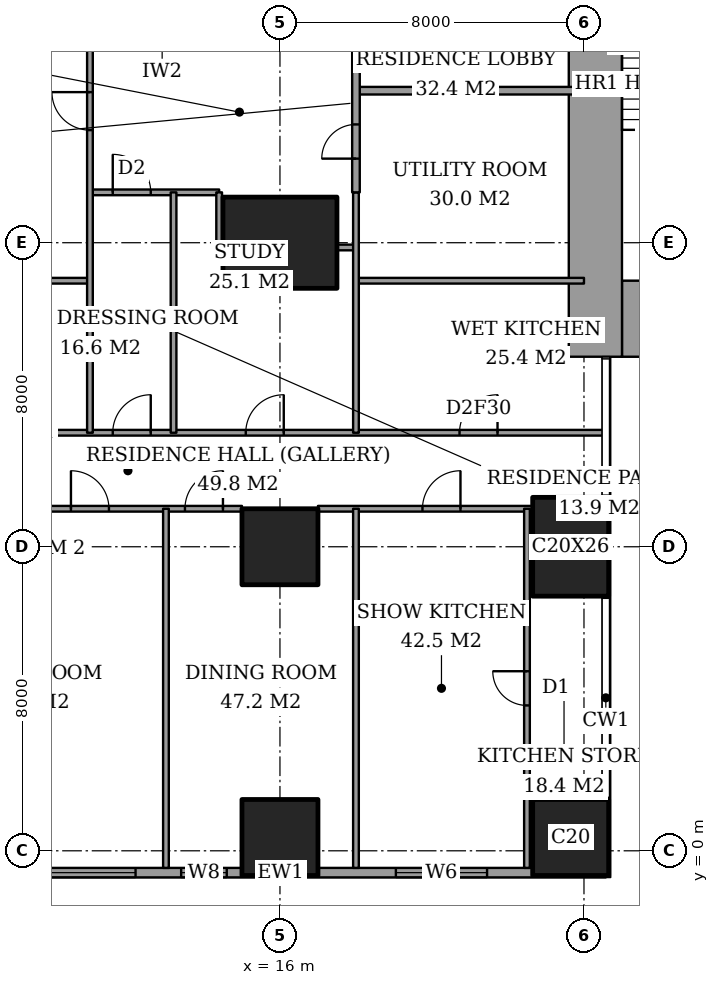
"""IFC4 building model, lengths in metres.
Left out: names, types, materials, properties, quantities, classifications, styles, units other than length and angle.
Written with IfcOpenShell. Run it as: python <this file> out.ifc"""

import sys

from ifc_helpers import new_model, si_unit, direction, frame, frame_2d, origin, origin_2d, place, context, subcontext, project, spatial, rectangle, extrude, element, fill, save


model = new_model("IFC4")
c1 = context("Model", 3, precision=1e-05, world=origin(), true_north=direction((0.0, 1.0)))
c2 = subcontext(c1, "Body", "Model", "MODEL_VIEW")
j1 = project(units=[si_unit("LENGTHUNIT", "METRE"), si_unit("PLANEANGLEUNIT", "RADIAN")], contexts=[c1])
p1 = place(None, origin())
s1 = spatial("IfcSite", under=j1, at=p1, CompositionType="ELEMENT")
p2 = place(p1, origin())
s2 = spatial("IfcBuilding", under=s1, at=p2, CompositionType="ELEMENT")
p3 = place(p2, frame((0.0, 0.0, 69.2)))
s3 = spatial("IfcBuildingStorey", under=s2, at=p3, CompositionType="ELEMENT", Elevation=69.2)
for number, where, z_axis, x_axis in (
    (1, (16.0, 0.35, 0.0), (0.0, 0.0, 1.0), (1.0, 0.0, 0.0)),
    (2, (16.0, 8.0, 0.0), (0.0, 0.0, 1.0), (1.0, 0.0, 0.0)),
):
    element("IfcColumn", number, at=place(p3, frame(where, z_axis=z_axis, x_axis=x_axis)), inside=s3, PredefinedType="COLUMN", context=c2, shape_type="SweptSolid", body=[
        extrude(rectangle(XDim=2.0, YDim=2.0, at=origin_2d()), origin(), (0.0, 0.0, 1.0), 3.6),
    ])
p4 = place(p3, frame((16.0, 16.0, 0.0), z_axis=(0.0, 0.0, 1.0), x_axis=(1.0, 0.0, 0.0)))
e3 = element("IfcColumn", 3, at=p4, inside=s3, PredefinedType="COLUMN", context=c2, shape_type="SweptSolid", body=[
    extrude(rectangle(XDim=3.0, YDim=2.4, at=origin_2d()), origin(), (0.0, 0.0, 1.0), 3.6),
])
p5 = place(p3, frame((23.65, 0.35, 0.0), z_axis=(0.0, 0.0, 1.0), x_axis=(1.0, 0.0, 0.0)))
e4 = element("IfcColumn", 4, at=p5, inside=s3, PredefinedType="COLUMN", context=c2, shape_type="SweptSolid", body=[
    extrude(rectangle(XDim=2.0, YDim=2.0, at=origin_2d()), origin(), (0.0, 0.0, 1.0), 3.6),
])
p6 = place(p3, frame((23.65, 8.0, 0.0), z_axis=(0.0, 0.0, 1.0), x_axis=(1.0, 0.0, 0.0)))
e5 = element("IfcColumn", 5, at=p6, inside=s3, PredefinedType="COLUMN", context=c2, shape_type="SweptSolid", body=[
    extrude(rectangle(XDim=2.0, YDim=2.6, at=origin_2d()), origin(), (0.0, 0.0, 1.0), 3.6),
])
p7 = place(p3, frame((25.0, 14.0, 0.0), z_axis=(0.0, 0.0, 1.0), x_axis=(1.0, 0.0, 0.0)))
e6 = element("IfcWall", 6, at=p7, inside=s3, PredefinedType="SHEAR", context=c2, shape_type="SweptSolid", body=[
    extrude(rectangle(XDim=3.15, YDim=2.0, at=frame_2d((1.575, 0.0))), origin(), (0.0, 0.0, 1.0), 3.6),
])
p8 = place(p3, frame((24.3, 13.0, 0.0), z_axis=(0.0, 0.0, 1.0), x_axis=(0.0, 1.0, 0.0)))
e7 = element("IfcWall", 7, at=p8, inside=s3, PredefinedType="SHEAR", context=c2, shape_type="SweptSolid", body=[
    extrude(rectangle(XDim=10.15, YDim=1.4, at=frame_2d((5.075, 0.0))), origin(), (0.0, 0.0, 1.0), 3.6),
])
p9 = place(p3, frame((3.175, -0.575, 0.0), z_axis=(0.0, 0.0, 1.0), x_axis=(1.0, 0.0, 0.0)))
e8 = element("IfcWall", 8, at=p9, inside=s3, PredefinedType="SOLIDWALL", context=c2, shape_type="SweptSolid", body=[
    extrude(rectangle(XDim=21.4, YDim=0.25, at=frame_2d((10.7, 0.0))), origin(), (0.0, 0.0, 1.0), 3.6),
])
p10 = place(p9, frame((0.775, 0.0, 0.6)))
e9 = element("IfcOpeningElement", 9, at=p10, cuts=e8, PredefinedType="OPENING", context=c2, shape_type="SweptSolid", body=[
    extrude(rectangle(XDim=1.2, YDim=2.0, at=frame_2d((0.6, 1.0))), frame((0.0, 0.135, 0.0), z_axis=(0.0, -1.0, 0.0), x_axis=(1.0, 0.0, 0.0)), (0.0, 0.0, 1.0), 0.27),
])
p11 = place(p9, frame((6.625, 0.0, 0.6)))
e10 = element("IfcOpeningElement", 10, at=p11, cuts=e8, PredefinedType="OPENING", context=c2, shape_type="SweptSolid", body=[
    extrude(rectangle(XDim=2.4, YDim=2.0, at=frame_2d((1.2, 1.0))), frame((0.0, 0.135, 0.0), z_axis=(0.0, -1.0, 0.0), x_axis=(1.0, 0.0, 0.0)), (0.0, 0.0, 1.0), 0.27),
])
p12 = place(p9, frame((10.225, 0.0, 0.6)))
e11 = element("IfcOpeningElement", 11, at=p12, cuts=e8, PredefinedType="OPENING", context=c2, shape_type="SweptSolid", body=[
    extrude(rectangle(XDim=1.2, YDim=2.0, at=frame_2d((0.6, 1.0))), frame((0.0, 0.135, 0.0), z_axis=(0.0, -1.0, 0.0), x_axis=(1.0, 0.0, 0.0)), (0.0, 0.0, 1.0), 0.27),
])
p13 = place(p9, frame((15.875, 0.0, 0.6)))
e12 = element("IfcOpeningElement", 12, at=p13, cuts=e8, PredefinedType="OPENING", context=c2, shape_type="SweptSolid", body=[
    extrude(rectangle(XDim=2.4, YDim=2.0, at=frame_2d((1.2, 1.0))), frame((0.0, 0.135, 0.0), z_axis=(0.0, -1.0, 0.0), x_axis=(1.0, 0.0, 0.0)), (0.0, 0.0, 1.0), 0.27),
])
p14 = place(p3, frame((9.0, 9.0, 0.0), z_axis=(0.0, 0.0, 1.0), x_axis=(1.0, 0.0, 0.0)))
e13 = element("IfcWall", 13, at=p14, inside=s3, PredefinedType="PARTITIONING", context=c2, shape_type="SweptSolid", body=[
    extrude(rectangle(XDim=6.0, YDim=0.15, at=frame_2d((3.0, 0.0))), origin(), (0.0, 0.0, 1.0), 3.35),
])
p15 = place(p14, frame((1.5, 0.0, 0.0)))
e14 = element("IfcOpeningElement", 14, at=p15, cuts=e13, PredefinedType="OPENING", context=c2, shape_type="SweptSolid", body=[
    extrude(rectangle(XDim=1.0, YDim=2.1, at=frame_2d((0.5, 1.05))), frame((0.0, 0.085, 0.0), z_axis=(0.0, -1.0, 0.0), x_axis=(1.0, 0.0, 0.0)), (0.0, 0.0, 1.0), 0.17),
])
p16 = place(p14, frame((4.5, 0.0, 0.0)))
e15 = element("IfcOpeningElement", 15, at=p16, cuts=e13, PredefinedType="OPENING", context=c2, shape_type="SweptSolid", body=[
    extrude(rectangle(XDim=1.0, YDim=2.1, at=frame_2d((0.5, 1.05))), frame((0.0, 0.085, 0.0), z_axis=(0.0, -1.0, 0.0), x_axis=(1.0, 0.0, 0.0)), (0.0, 0.0, 1.0), 0.17),
])
p17 = place(p3, frame((17.0, 9.0, 0.0), z_axis=(0.0, 0.0, 1.0), x_axis=(1.0, 0.0, 0.0)))
e16 = element("IfcWall", 16, at=p17, inside=s3, PredefinedType="PARTITIONING", context=c2, shape_type="SweptSolid", body=[
    extrude(rectangle(XDim=5.65, YDim=0.15, at=frame_2d((2.825, 0.0))), origin(), (0.0, 0.0, 1.0), 3.35),
])
p18 = place(p17, frame((2.75, 0.0, 0.0)))
e17 = element("IfcOpeningElement", 17, at=p18, cuts=e16, PredefinedType="OPENING", context=c2, shape_type="SweptSolid", body=[
    extrude(rectangle(XDim=1.0, YDim=2.1, at=frame_2d((0.5, 1.05))), frame((0.0, 0.085, 0.0), z_axis=(0.0, -1.0, 0.0), x_axis=(1.0, 0.0, 0.0)), (0.0, 0.0, 1.0), 0.17),
])
p19 = place(p3, frame((-0.45, 11.0, 0.0), z_axis=(0.0, 0.0, 1.0), x_axis=(1.0, 0.0, 0.0)))
e18 = element("IfcWall", 18, at=p19, inside=s3, PredefinedType="PARTITIONING", context=c2, shape_type="SweptSolid", body=[
    extrude(rectangle(XDim=25.011, YDim=0.15, at=frame_2d((12.505, 0.0))), origin(), (0.0, 0.0, 1.0), 3.35),
])
p20 = place(p19, frame((12.05, 0.0, 0.0)))
e19 = element("IfcOpeningElement", 19, at=p20, cuts=e18, PredefinedType="OPENING", context=c2, shape_type="SweptSolid", body=[
    extrude(rectangle(XDim=1.0, YDim=2.1, at=frame_2d((0.5, 1.05))), frame((0.0, 0.085, 0.0), z_axis=(0.0, -1.0, 0.0), x_axis=(1.0, 0.0, 0.0)), (0.0, 0.0, 1.0), 0.17),
])
p21 = place(p19, frame((3.087, 0.0, 0.0)))
e20 = element("IfcOpeningElement", 20, at=p21, cuts=e18, PredefinedType="OPENING", context=c2, shape_type="SweptSolid", body=[
    extrude(rectangle(XDim=1.0, YDim=2.1, at=frame_2d((0.5, 1.05))), frame((0.0, 0.085, 0.0), z_axis=(0.0, -1.0, 0.0), x_axis=(1.0, 0.0, 0.0)), (0.0, 0.0, 1.0), 0.17),
])
p22 = place(p19, frame((15.55, 0.0, 0.0)))
e21 = element("IfcOpeningElement", 21, at=p22, cuts=e18, PredefinedType="OPENING", context=c2, shape_type="SweptSolid", body=[
    extrude(rectangle(XDim=1.0, YDim=2.1, at=frame_2d((0.5, 1.05))), frame((0.0, 0.085, 0.0), z_axis=(0.0, -1.0, 0.0), x_axis=(1.0, 0.0, 0.0)), (0.0, 0.0, 1.0), 0.17),
])
p23 = place(p19, frame((21.175, 0.0, 0.0)))
e22 = element("IfcOpeningElement", 22, at=p23, cuts=e18, PredefinedType="OPENING", context=c2, shape_type="SweptSolid", body=[
    extrude(rectangle(XDim=1.0, YDim=2.1, at=frame_2d((0.5, 1.05))), frame((0.0, 0.085, 0.0), z_axis=(0.0, -1.0, 0.0), x_axis=(1.0, 0.0, 0.0)), (0.0, 0.0, 1.0), 0.17),
])
p24 = place(p3, frame((9.5, 15.0, 0.0), z_axis=(0.0, 0.0, 1.0), x_axis=(1.0, 0.0, 0.0)))
e23 = element("IfcWall", 23, at=p24, inside=s3, PredefinedType="PARTITIONING", context=c2, shape_type="SweptSolid", body=[
    extrude(rectangle(XDim=1.5, YDim=0.15, at=frame_2d((0.75, 0.0))), origin(), (0.0, 0.0, 1.0), 3.35),
])
p25 = place(p3, frame((18.0, 15.0, 0.0), z_axis=(0.0, 0.0, 1.0), x_axis=(1.0, 0.0, 0.0)))
e24 = element("IfcWall", 24, at=p25, inside=s3, PredefinedType="PARTITIONING", context=c2, shape_type="SweptSolid", body=[
    extrude(rectangle(XDim=6.0, YDim=0.15, at=frame_2d((3.0, 0.0))), origin(), (0.0, 0.0, 1.0), 3.35),
])
p26 = place(p3, frame((17.5, 15.875, 0.0), z_axis=(0.0, 0.0, 1.0), x_axis=(1.0, 0.0, 0.0)))
e25 = element("IfcWall", 25, at=p26, inside=s3, PredefinedType="PARTITIONING", context=c2, shape_type="SweptSolid", body=[
    extrude(rectangle(XDim=0.5, YDim=0.15, at=frame_2d((0.25, 0.0))), origin(), (0.0, 0.0, 1.0), 2.634),
])
p27 = place(p3, frame((11.0, 17.325, 0.0), z_axis=(0.0, 0.0, 1.0), x_axis=(1.0, 0.0, 0.0)))
e26 = element("IfcWall", 26, at=p27, inside=s3, PredefinedType="PARTITIONING", context=c2, shape_type="SweptSolid", body=[
    extrude(rectangle(XDim=3.4, YDim=0.15, at=frame_2d((1.7, 0.0))), origin(), (0.0, 0.0, 1.0), 3.35),
])
p28 = place(p27, frame((0.6, 0.0, 0.0)))
e27 = element("IfcOpeningElement", 27, at=p28, cuts=e26, PredefinedType="OPENING", context=c2, shape_type="SweptSolid", body=[
    extrude(rectangle(XDim=1.0, YDim=2.1, at=frame_2d((0.5, 1.05))), frame((0.0, 0.085, 0.0), z_axis=(0.0, -1.0, 0.0), x_axis=(1.0, 0.0, 0.0)), (0.0, 0.0, 1.0), 0.17),
])
p29 = place(p3, frame((18.0, 20.0, 0.0), z_axis=(0.0, 0.0, 1.0), x_axis=(1.0, 0.0, 0.0)))
e28 = element("IfcWall", 28, at=p29, inside=s3, PredefinedType="PARTITIONING", context=c2, shape_type="SweptSolid", body=[
    extrude(rectangle(XDim=6.0, YDim=0.2, at=frame_2d((3.0, 0.0))), origin(), (0.0, 0.0, 1.0), 3.35),
])
p30 = place(p3, frame((11.0, 11.0, 0.0), z_axis=(0.0, 0.0, 1.0), x_axis=(0.0, 1.0, 0.0)))
e29 = element("IfcWall", 29, at=p30, inside=s3, PredefinedType="PARTITIONING", context=c2, shape_type="SweptSolid", body=[
    extrude(rectangle(XDim=10.6, YDim=0.15, at=frame_2d((5.3, 0.0))), origin(), (0.0, 0.0, 1.0), 3.35),
])
p31 = place(p30, frame((7.962, 0.0, 0.0)))
e30 = element("IfcOpeningElement", 30, at=p31, cuts=e29, PredefinedType="OPENING", context=c2, shape_type="SweptSolid", body=[
    extrude(rectangle(XDim=1.0, YDim=2.1, at=frame_2d((0.5, 1.05))), frame((0.0, 0.085, 0.0), z_axis=(0.0, -1.0, 0.0), x_axis=(1.0, 0.0, 0.0)), (0.0, 0.0, 1.0), 0.17),
])
p32 = place(p3, frame((13.0, -0.45, 0.0), z_axis=(0.0, 0.0, 1.0), x_axis=(0.0, 1.0, 0.0)))
e31 = element("IfcWall", 31, at=p32, inside=s3, PredefinedType="PARTITIONING", context=c2, shape_type="SweptSolid", body=[
    extrude(rectangle(XDim=9.45, YDim=0.15, at=frame_2d((4.725, 0.0))), origin(), (0.0, 0.0, 1.0), 3.35),
])
p33 = place(p3, frame((13.2, 11.0, 0.0), z_axis=(0.0, 0.0, 1.0), x_axis=(0.0, 1.0, 0.0)))
e32 = element("IfcWall", 32, at=p33, inside=s3, PredefinedType="PARTITIONING", context=c2, shape_type="SweptSolid", body=[
    extrude(rectangle(XDim=6.325, YDim=0.15, at=frame_2d((3.163, 0.0))), origin(), (0.0, 0.0, 1.0), 3.35),
])
p34 = place(p3, frame((14.4, 15.875, 0.0), z_axis=(0.0, 0.0, 1.0), x_axis=(0.0, 1.0, 0.0)))
e33 = element("IfcWall", 33, at=p34, inside=s3, PredefinedType="PARTITIONING", context=c2, shape_type="SweptSolid", body=[
    extrude(rectangle(XDim=1.45, YDim=0.15, at=frame_2d((0.725, 0.0))), origin(), (0.0, 0.0, 1.0), 3.35),
])
p35 = place(p3, frame((18.0, 17.325, 0.0), z_axis=(0.0, 0.0, 1.0), x_axis=(0.0, 1.0, 0.0)))
e34 = element("IfcWall", 34, at=p35, inside=s3, PredefinedType="PARTITIONING", context=c2, shape_type="SweptSolid", body=[
    extrude(rectangle(XDim=6.675, YDim=0.2, at=frame_2d((3.337, 0.0))), origin(), (0.0, 0.0, 1.0), 3.35),
])
p36 = place(p35, frame((4.075, 0.0, 0.0)))
e35 = element("IfcOpeningElement", 35, at=p36, cuts=e34, PredefinedType="OPENING", context=c2, shape_type="SweptSolid", body=[
    extrude(rectangle(XDim=1.2, YDim=2.4, at=frame_2d((0.6, 1.2))), frame((0.0, 0.11, 0.0), z_axis=(0.0, -1.0, 0.0), x_axis=(1.0, 0.0, 0.0)), (0.0, 0.0, 1.0), 0.22),
])
p37 = place(p35, frame((0.887, 0.0, 0.0)))
e36 = element("IfcOpeningElement", 36, at=p37, cuts=e34, PredefinedType="OPENING", context=c2, shape_type="SweptSolid", body=[
    extrude(rectangle(XDim=0.9, YDim=2.1, at=frame_2d((0.45, 1.05))), frame((0.0, 0.11, 0.0), z_axis=(0.0, -1.0, 0.0), x_axis=(1.0, 0.0, 0.0)), (0.0, 0.0, 1.0), 0.22),
])
p38 = place(p3, frame((18.0, -0.45, 0.0), z_axis=(0.0, 0.0, 1.0), x_axis=(0.0, 1.0, 0.0)))
e37 = element("IfcWall", 37, at=p38, inside=s3, PredefinedType="PARTITIONING", context=c2, shape_type="SweptSolid", body=[
    extrude(rectangle(XDim=9.45, YDim=0.15, at=frame_2d((4.725, 0.0))), origin(), (0.0, 0.0, 1.0), 3.35),
])
p39 = place(p3, frame((18.0, 11.0, 0.0), z_axis=(0.0, 0.0, 1.0), x_axis=(0.0, 1.0, 0.0)))
e38 = element("IfcWall", 38, at=p39, inside=s3, PredefinedType="PARTITIONING", context=c2, shape_type="SweptSolid", body=[
    extrude(rectangle(XDim=6.325, YDim=0.15, at=frame_2d((3.163, 0.0))), origin(), (0.0, 0.0, 1.0), 3.35),
])
p40 = place(p3, frame((22.5, -0.45, 0.0), z_axis=(0.0, 0.0, 1.0), x_axis=(0.0, 1.0, 0.0)))
e39 = element("IfcWall", 39, at=p40, inside=s3, PredefinedType="PARTITIONING", context=c2, shape_type="SweptSolid", body=[
    extrude(rectangle(XDim=9.45, YDim=0.15, at=frame_2d((4.725, 0.0))), origin(), (0.0, 0.0, 1.0), 3.35),
])
p41 = place(p40, frame((4.275, 0.0, 0.0)))
e40 = element("IfcOpeningElement", 40, at=p41, cuts=e39, PredefinedType="OPENING", context=c2, shape_type="SweptSolid", body=[
    extrude(rectangle(XDim=0.9, YDim=2.1, at=frame_2d((0.45, 1.05))), frame((0.0, 0.085, 0.0), z_axis=(0.0, -1.0, 0.0), x_axis=(1.0, 0.0, 0.0)), (0.0, 0.0, 1.0), 0.17),
])
p42 = place(p11, origin())
e41 = element("IfcWindow", 41, at=p42, inside=s3, PartitioningType="SINGLE_PANEL", PredefinedType="WINDOW", context=c2, shape_type="SweptSolid", body=[
    extrude(rectangle(XDim=2.4, YDim=2.0, at=frame_2d((1.2, 1.0))), frame((0.0, 0.03, 0.0), z_axis=(0.0, -1.0, 0.0), x_axis=(1.0, 0.0, 0.0)), (0.0, 0.0, 1.0), 0.06),
])
fill(e10, e41)
p43 = place(p12, origin())
e42 = element("IfcWindow", 42, at=p43, inside=s3, PartitioningType="SINGLE_PANEL", PredefinedType="WINDOW", context=c2, shape_type="SweptSolid", body=[
    extrude(rectangle(XDim=1.2, YDim=2.0, at=frame_2d((0.6, 1.0))), frame((0.0, 0.03, 0.0), z_axis=(0.0, -1.0, 0.0), x_axis=(1.0, 0.0, 0.0)), (0.0, 0.0, 1.0), 0.06),
])
fill(e11, e42)
p44 = place(p13, origin())
e43 = element("IfcWindow", 43, at=p44, inside=s3, PartitioningType="SINGLE_PANEL", PredefinedType="WINDOW", context=c2, shape_type="SweptSolid", body=[
    extrude(rectangle(XDim=2.4, YDim=2.0, at=frame_2d((1.2, 1.0))), frame((0.0, 0.03, 0.0), z_axis=(0.0, -1.0, 0.0), x_axis=(1.0, 0.0, 0.0)), (0.0, 0.0, 1.0), 0.06),
])
fill(e12, e43)
p45 = place(p15, origin())
e44 = element("IfcDoor", 44, at=p45, inside=s3, OperationType="SINGLE_SWING_RIGHT", PredefinedType="DOOR", context=c2, shape_type="SweptSolid", body=[
    extrude(rectangle(XDim=1.0, YDim=2.1, at=frame_2d((0.5, 1.05))), frame((0.0, 0.025, 0.0), z_axis=(0.0, -1.0, 0.0), x_axis=(1.0, 0.0, 0.0)), (0.0, 0.0, 1.0), 0.05),
])
fill(e14, e44)
p46 = place(p16, origin())
e45 = element("IfcDoor", 45, at=p46, inside=s3, OperationType="SINGLE_SWING_LEFT", PredefinedType="DOOR", context=c2, shape_type="SweptSolid", body=[
    extrude(rectangle(XDim=1.0, YDim=2.1, at=frame_2d((0.5, 1.05))), frame((0.0, 0.025, 0.0), z_axis=(0.0, -1.0, 0.0), x_axis=(1.0, 0.0, 0.0)), (0.0, 0.0, 1.0), 0.05),
])
fill(e15, e45)
p47 = place(p18, origin())
e46 = element("IfcDoor", 46, at=p47, inside=s3, OperationType="SINGLE_SWING_LEFT", PredefinedType="DOOR", context=c2, shape_type="SweptSolid", body=[
    extrude(rectangle(XDim=1.0, YDim=2.1, at=frame_2d((0.5, 1.05))), frame((0.0, 0.025, 0.0), z_axis=(0.0, -1.0, 0.0), x_axis=(1.0, 0.0, 0.0)), (0.0, 0.0, 1.0), 0.05),
])
fill(e17, e46)
p48 = place(p41, origin())
e47 = element("IfcDoor", 47, at=p48, inside=s3, OperationType="SINGLE_SWING_LEFT", PredefinedType="DOOR", context=c2, shape_type="SweptSolid", body=[
    extrude(rectangle(XDim=0.9, YDim=2.1, at=frame_2d((0.45, 1.05))), frame((0.0, 0.025, 0.0), z_axis=(0.0, -1.0, 0.0), x_axis=(1.0, 0.0, 0.0)), (0.0, 0.0, 1.0), 0.05),
])
fill(e40, e47)
p49 = place(p20, origin())
e48 = element("IfcDoor", 48, at=p49, inside=s3, OperationType="SINGLE_SWING_LEFT", PredefinedType="DOOR", context=c2, shape_type="SweptSolid", body=[
    extrude(rectangle(XDim=1.0, YDim=2.1, at=frame_2d((0.5, 1.05))), frame((0.0, 0.025, 0.0), z_axis=(0.0, -1.0, 0.0), x_axis=(1.0, 0.0, 0.0)), (0.0, 0.0, 1.0), 0.05),
])
fill(e19, e48)
p50 = place(p31, origin())
e49 = element("IfcDoor", 49, at=p50, inside=s3, OperationType="SINGLE_SWING_LEFT", PredefinedType="DOOR", context=c2, shape_type="SweptSolid", body=[
    extrude(rectangle(XDim=1.0, YDim=2.1, at=frame_2d((0.5, 1.05))), frame((0.0, 0.025, 0.0), z_axis=(0.0, -1.0, 0.0), x_axis=(1.0, 0.0, 0.0)), (0.0, 0.0, 1.0), 0.05),
])
fill(e30, e49)
p51 = place(p28, origin())
e50 = element("IfcDoor", 50, at=p51, inside=s3, OperationType="SINGLE_SWING_RIGHT", PredefinedType="DOOR", context=c2, shape_type="SweptSolid", body=[
    extrude(rectangle(XDim=1.0, YDim=2.1, at=frame_2d((0.5, 1.05))), frame((0.0, 0.025, 0.0), z_axis=(0.0, -1.0, 0.0), x_axis=(1.0, 0.0, 0.0)), (0.0, 0.0, 1.0), 0.05),
])
fill(e27, e50)
p52 = place(p22, origin())
e51 = element("IfcDoor", 51, at=p52, inside=s3, OperationType="SINGLE_SWING_LEFT", PredefinedType="DOOR", context=c2, shape_type="SweptSolid", body=[
    extrude(rectangle(XDim=1.0, YDim=2.1, at=frame_2d((0.5, 1.05))), frame((0.0, 0.025, 0.0), z_axis=(0.0, -1.0, 0.0), x_axis=(1.0, 0.0, 0.0)), (0.0, 0.0, 1.0), 0.05),
])
fill(e21, e51)
p53 = place(p23, origin())
e52 = element("IfcDoor", 52, at=p53, inside=s3, OperationType="SINGLE_SWING_LEFT", PredefinedType="DOOR", context=c2, shape_type="SweptSolid", body=[
    extrude(rectangle(XDim=1.0, YDim=2.1, at=frame_2d((0.5, 1.05))), frame((0.0, 0.025, 0.0), z_axis=(0.0, -1.0, 0.0), x_axis=(1.0, 0.0, 0.0)), (0.0, 0.0, 1.0), 0.05),
])
fill(e22, e52)
p54 = place(p37, origin())
e53 = element("IfcDoor", 53, at=p54, inside=s3, OperationType="SINGLE_SWING_RIGHT", PredefinedType="DOOR", context=c2, shape_type="SweptSolid", body=[
    extrude(rectangle(XDim=0.9, YDim=2.1, at=frame_2d((0.45, 1.05))), frame((0.0, 0.025, 0.0), z_axis=(0.0, -1.0, 0.0), x_axis=(1.0, 0.0, 0.0)), (0.0, 0.0, 1.0), 0.05),
])
fill(e36, e53)
save(model, sys.argv[1])
